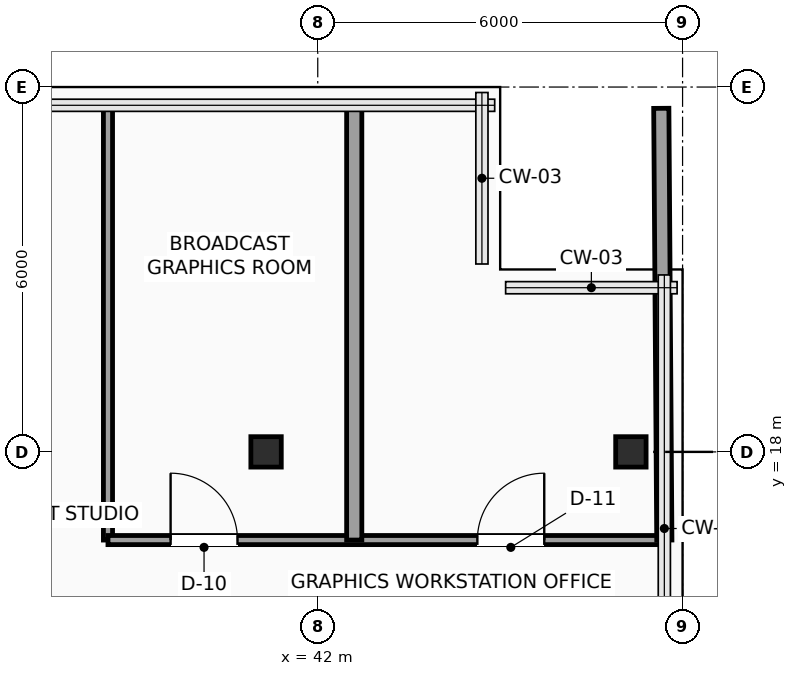
"""IFC4 building model, lengths in metres.
Left out: names, types, materials, properties, quantities, classifications, styles, units other than length and angle.
Written with IfcOpenShell. Run it as: python <this file> out.ifc"""

import sys

from ifc_helpers import new_model, si_unit, direction, frame, frame_2d, origin, origin_2d, place, context, subcontext, project, spatial, rectangle, hollow_rectangle, extrude, element, fill, save


model = new_model("IFC4")
c1 = context("Model", 3, precision=1e-05, world=origin(), true_north=direction((0.0, 1.0)))
c2 = subcontext(c1, "Body", "Model", "MODEL_VIEW")
j1 = project(units=[si_unit("LENGTHUNIT", "METRE"), si_unit("PLANEANGLEUNIT", "RADIAN")], contexts=[c1])
p1 = place(None, origin())
s1 = spatial("IfcSite", under=j1, at=p1, CompositionType="ELEMENT")
p2 = place(p1, origin())
s2 = spatial("IfcBuilding", under=s1, at=p2, CompositionType="ELEMENT")
p3 = place(p2, frame((0.0, 0.0, 134.4)))
s3 = spatial("IfcBuildingStorey", under=s2, at=p3, CompositionType="ELEMENT", Elevation=134.4)
for number, where, z_axis, x_axis in (
    (1, (41.15, 18.0, 0.0), (0.0, 0.0, 1.0), (1.0, 0.0, 0.0)),
    (2, (47.15, 18.0, 0.0), (0.0, 0.0, 1.0), (1.0, 0.0, 0.0)),
):
    element("IfcColumn", number, at=place(p3, frame(where, z_axis=z_axis, x_axis=x_axis)), inside=s3, PredefinedType="COLUMN", context=c2, shape_type="SweptSolid", body=[
        extrude(hollow_rectangle(XDim=0.5, YDim=0.5, WallThickness=0.025, InnerFilletRadius=0.025, OuterFilletRadius=0.04, at=origin_2d()), origin(), (0.0, 0.0, 1.0), 3.75),
    ])
p4 = place(p3, frame((38.55, 23.7, 0.0), z_axis=(0.0, 0.0, 1.0), x_axis=(0.0, -1.0, 0.0)))
e3 = element("IfcWall", 3, at=p4, inside=s3, PredefinedType="PARTITIONING", context=c2, shape_type="SweptSolid", body=[
    extrude(rectangle(XDim=7.15, YDim=0.15, at=frame_2d((3.575, 0.0))), origin(), (0.0, 0.0, 1.0), 3.525),
])
p5 = place(p3, frame((38.55, 16.55, 0.0), z_axis=(0.0, 0.0, 1.0), x_axis=(1.0, 0.0, 0.0)))
e4 = element("IfcWall", 4, at=p5, inside=s3, PredefinedType="PARTITIONING", context=c2, shape_type="SweptSolid", body=[
    extrude(rectangle(XDim=9.15, YDim=0.15, at=frame_2d((4.575, 0.0))), origin(), (0.0, 0.0, 1.0), 3.525),
])
p6 = place(p5, frame((1.03, 0.0, 0.0)))
e5 = element("IfcOpeningElement", 5, at=p6, cuts=e4, PredefinedType="OPENING", context=c2, shape_type="SweptSolid", body=[
    extrude(rectangle(XDim=1.1, YDim=2.25, at=frame_2d((0.55, 1.125))), frame((0.0, 0.085, 0.0), z_axis=(0.0, -1.0, 0.0), x_axis=(1.0, 0.0, 0.0)), (0.0, 0.0, 1.0), 0.17),
])
p7 = place(p5, frame((6.075, 0.0, 0.0)))
e6 = element("IfcOpeningElement", 6, at=p7, cuts=e4, PredefinedType="OPENING", context=c2, shape_type="SweptSolid", body=[
    extrude(rectangle(XDim=1.1, YDim=2.25, at=frame_2d((0.55, 1.125))), frame((0.0, 0.085, 0.0), z_axis=(0.0, -1.0, 0.0), x_axis=(1.0, 0.0, 0.0)), (0.0, 0.0, 1.0), 0.17),
])
p8 = place(p3, frame((42.6, 16.55, 0.0), z_axis=(0.0, 0.0, 1.0), x_axis=(0.0, 1.0, 0.0)))
e7 = element("IfcWall", 7, at=p8, inside=s3, PredefinedType="PARTITIONING", context=c2, shape_type="SweptSolid", body=[
    extrude(rectangle(XDim=7.15, YDim=0.25, at=frame_2d((3.575, 0.0))), origin(), (0.0, 0.0, 1.0), 3.525),
])
p9 = place(p3, frame((47.7, 16.55, 0.0), z_axis=(0.0, 0.0, 1.0), x_axis=(-0.007049101019, 0.999975154779, 0.0)))
e8 = element("IfcWall", 8, at=p9, inside=s3, PredefinedType="PARTITIONING", context=c2, shape_type="SweptSolid", body=[
    extrude(rectangle(XDim=7.1, YDim=0.25, at=frame_2d((3.55, 0.0))), origin(), (0.0, 0.0, 1.0), 3.525),
])
p10 = place(p6, origin())
e9 = element("IfcDoor", 9, at=p10, inside=s3, OperationType="SINGLE_SWING_LEFT", PredefinedType="DOOR", context=c2, shape_type="SweptSolid", body=[
    extrude(rectangle(XDim=1.1, YDim=2.25, at=frame_2d((0.55, 1.125))), frame((0.0, 0.025, 0.0), z_axis=(0.0, -1.0, 0.0), x_axis=(1.0, 0.0, 0.0)), (0.0, 0.0, 1.0), 0.05),
])
fill(e5, e9)
p11 = place(p7, origin())
e10 = element("IfcDoor", 10, at=p11, inside=s3, OperationType="SINGLE_SWING_RIGHT", PredefinedType="DOOR", context=c2, shape_type="SweptSolid", body=[
    extrude(rectangle(XDim=1.1, YDim=2.25, at=frame_2d((0.55, 1.125))), frame((0.0, 0.025, 0.0), z_axis=(0.0, -1.0, 0.0), x_axis=(1.0, 0.0, 0.0)), (0.0, 0.0, 1.0), 0.05),
])
fill(e6, e10)
save(model, sys.argv[1])
